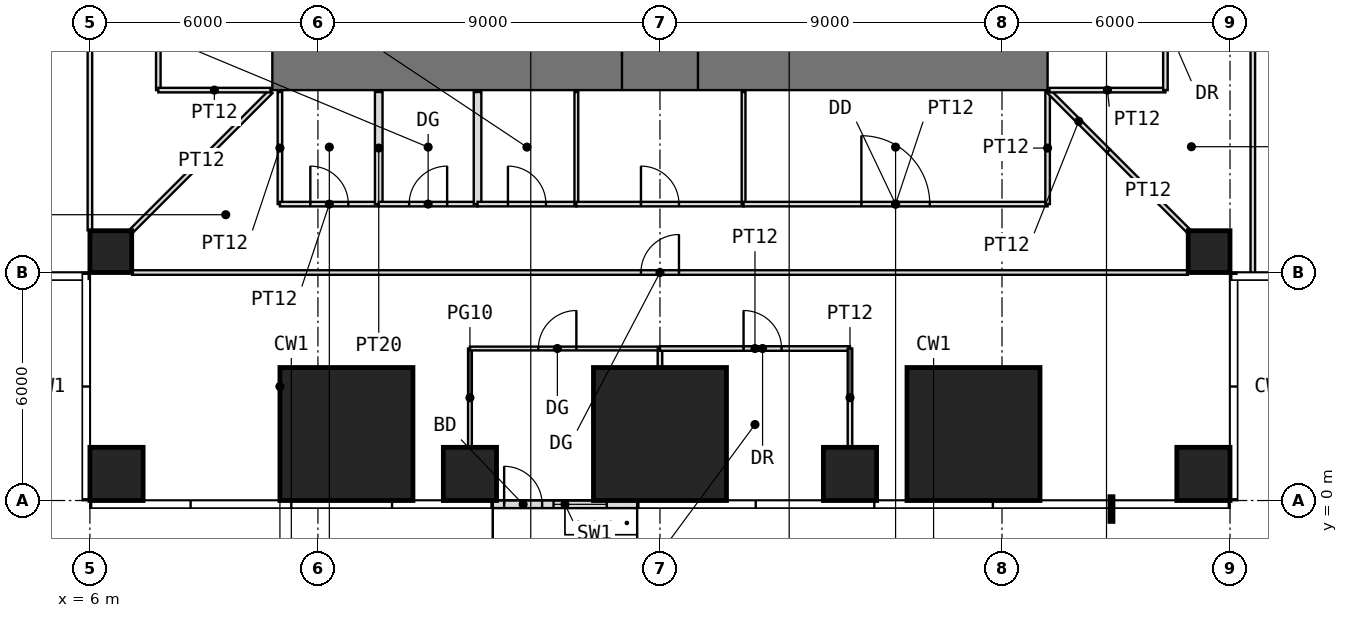
"""IFC4 building model, lengths in metres.
Left out: names, types, materials, properties, quantities, classifications, styles, units other than length and angle.
Written with IfcOpenShell. Run it as: python <this file> out.ifc"""

import sys

from ifc_helpers import new_model, si_unit, direction, frame, frame_2d, origin, origin_2d, place, context, subcontext, project, spatial, rectangle, extrude, element, fill, save


model = new_model("IFC4")
c1 = context("Model", 3, precision=1e-05, world=origin(), true_north=direction((0.0, 1.0)))
c2 = subcontext(c1, "Body", "Model", "MODEL_VIEW")
j1 = project(units=[si_unit("LENGTHUNIT", "METRE"), si_unit("PLANEANGLEUNIT", "RADIAN")], contexts=[c1])
p1 = place(None, origin())
s1 = spatial("IfcSite", under=j1, at=p1, CompositionType="ELEMENT")
p2 = place(p1, origin())
s2 = spatial("IfcBuilding", under=s1, at=p2, CompositionType="ELEMENT")
p3 = place(p2, frame((0.0, 0.0, 62.5)))
s3 = spatial("IfcBuildingStorey", under=s2, at=p3, CompositionType="ELEMENT", Elevation=62.5)
p4 = place(p3, frame((6.7, 0.7, 0.0), z_axis=(0.0, 0.0, 1.0), x_axis=(1.0, 0.0, 0.0)))
e1 = element("IfcColumn", 1, at=p4, inside=s3, PredefinedType="COLUMN", context=c2, shape_type="SweptSolid", body=[
    extrude(rectangle(XDim=1.4, YDim=1.4, at=origin_2d()), origin(), (0.0, 0.0, 1.0), 4.0),
])
p5 = place(p3, frame((12.75, 1.75, 0.0), z_axis=(0.0, 0.0, 1.0), x_axis=(1.0, 0.0, 0.0)))
e2 = element("IfcColumn", 2, at=p5, inside=s3, PredefinedType="COLUMN", context=c2, shape_type="SweptSolid", body=[
    extrude(rectangle(XDim=3.5, YDim=3.5, at=origin_2d()), origin(), (0.0, 0.0, 1.0), 4.0),
])
p6 = place(p3, frame((16.0, 0.7, 0.0), z_axis=(0.0, 0.0, 1.0), x_axis=(1.0, 0.0, 0.0)))
e3 = element("IfcColumn", 3, at=p6, inside=s3, PredefinedType="COLUMN", context=c2, shape_type="SweptSolid", body=[
    extrude(rectangle(XDim=1.4, YDim=1.4, at=origin_2d()), origin(), (0.0, 0.0, 1.0), 4.0),
])
p7 = place(p3, frame((21.0, 1.75, 0.0), z_axis=(0.0, 0.0, 1.0), x_axis=(1.0, 0.0, 0.0)))
e4 = element("IfcColumn", 4, at=p7, inside=s3, PredefinedType="COLUMN", context=c2, shape_type="SweptSolid", body=[
    extrude(rectangle(XDim=3.5, YDim=3.5, at=origin_2d()), origin(), (0.0, 0.0, 1.0), 4.0),
])
p8 = place(p3, frame((26.0, 0.7, 0.0), z_axis=(0.0, 0.0, 1.0), x_axis=(1.0, 0.0, 0.0)))
e5 = element("IfcColumn", 5, at=p8, inside=s3, PredefinedType="COLUMN", context=c2, shape_type="SweptSolid", body=[
    extrude(rectangle(XDim=1.4, YDim=1.4, at=origin_2d()), origin(), (0.0, 0.0, 1.0), 4.0),
])
p9 = place(p3, frame((29.25, 1.75, 0.0), z_axis=(0.0, 0.0, 1.0), x_axis=(1.0, 0.0, 0.0)))
e6 = element("IfcColumn", 6, at=p9, inside=s3, PredefinedType="COLUMN", context=c2, shape_type="SweptSolid", body=[
    extrude(rectangle(XDim=3.5, YDim=3.5, at=origin_2d()), origin(), (0.0, 0.0, 1.0), 4.0),
])
p10 = place(p3, frame((35.3, 0.7, 0.0), z_axis=(0.0, 0.0, 1.0), x_axis=(1.0, 0.0, 0.0)))
e7 = element("IfcColumn", 7, at=p10, inside=s3, PredefinedType="COLUMN", context=c2, shape_type="SweptSolid", body=[
    extrude(rectangle(XDim=1.4, YDim=1.4, at=origin_2d()), origin(), (0.0, 0.0, 1.0), 4.0),
])
for number, where, z_axis, x_axis in (
    (8, (6.55, 6.55, 0.0), (0.0, 0.0, 1.0), (1.0, 0.0, 0.0)),
    (9, (35.45, 6.55, 0.0), (0.0, 0.0, 1.0), (1.0, 0.0, 0.0)),
):
    element("IfcColumn", number, at=place(p3, frame(where, z_axis=z_axis, x_axis=x_axis)), inside=s3, PredefinedType="COLUMN", context=c2, shape_type="SweptSolid", body=[
        extrude(rectangle(XDim=1.1, YDim=1.1, at=origin_2d()), origin(), (0.0, 0.0, 1.0), 4.0),
    ])
p11 = place(p3, frame((16.6, -0.1, 0.0), z_axis=(0.0, 0.0, 1.0), x_axis=(1.0, 0.0, 0.0)))
e10 = element("IfcWall", 10, at=p11, inside=s3, PredefinedType="USERDEFINED", context=c2, shape_type="SweptSolid", body=[
    extrude(rectangle(XDim=3.8, YDim=0.2, at=frame_2d((1.9, 0.0))), origin(), (0.0, 0.0, 1.0), 3.75),
])
p12 = place(p11, frame((0.3, 0.0, 0.0)))
e11 = element("IfcOpeningElement", 11, at=p12, cuts=e10, PredefinedType="OPENING", context=c2, shape_type="SweptSolid", body=[
    extrude(rectangle(XDim=1.0, YDim=2.4, at=frame_2d((0.5, 1.2))), frame((0.0, 0.11, 0.0), z_axis=(0.0, -1.0, 0.0), x_axis=(1.0, 0.0, 0.0)), (0.0, 0.0, 1.0), 0.22),
])
p13 = place(p11, frame((1.6, 0.0, 0.3)))
e12 = element("IfcOpeningElement", 12, at=p13, cuts=e10, PredefinedType="OPENING", context=c2, shape_type="SweptSolid", body=[
    extrude(rectangle(XDim=1.4, YDim=2.7, at=frame_2d((0.7, 1.35))), frame((0.0, 0.11, 0.0), z_axis=(0.0, -1.0, 0.0), x_axis=(1.0, 0.0, 0.0)), (0.0, 0.0, 1.0), 0.22),
])
p14 = place(p3, frame((10.8, 11.7, -0.05), z_axis=(0.0, 0.0, 1.0), x_axis=(1.0, 0.0, 0.0)))
e13 = element("IfcWall", 13, at=p14, inside=s3, PredefinedType="SHEAR", context=c2, shape_type="SweptSolid", body=[
    extrude(rectangle(XDim=20.4, YDim=1.8, at=frame_2d((10.2, 0.0))), origin(), (0.0, 0.0, 1.0), 4.0),
])
p15 = place(p14, frame((9.2, 0.0, 0.05)))
e14 = element("IfcOpeningElement", 14, at=p15, cuts=e13, PredefinedType="OPENING", context=c2, shape_type="SweptSolid", body=[
    extrude(rectangle(XDim=2.0, YDim=2.2, at=frame_2d((1.0, 1.1))), frame((0.0, 0.91, 0.0), z_axis=(0.0, -1.0, 0.0), x_axis=(1.0, 0.0, 0.0)), (0.0, 0.0, 1.0), 1.82),
])
p16 = place(p3, frame((6.0, 7.11, 0.0), z_axis=(0.0, 0.0, 1.0), x_axis=(0.0, 1.0, 0.0)))
e15 = element("IfcWall", 15, at=p16, inside=s3, PredefinedType="PARTITIONING", context=c2, shape_type="SweptSolid", body=[
    extrude(rectangle(XDim=27.78, YDim=0.12, at=frame_2d((13.89, 0.0))), origin(), (0.0, 0.0, 1.0), 3.75),
])
p17 = place(p16, frame((13.39, 0.0, 0.0)))
e16 = element("IfcOpeningElement", 16, at=p17, cuts=e15, PredefinedType="OPENING", context=c2, shape_type="SweptSolid", body=[
    extrude(rectangle(XDim=1.0, YDim=2.4, at=frame_2d((0.5, 1.2))), frame((0.0, 0.07, 0.0), z_axis=(0.0, -1.0, 0.0), x_axis=(1.0, 0.0, 0.0)), (0.0, 0.0, 1.0), 0.14),
])
p18 = place(p3, frame((7.11, 6.0, 0.0), z_axis=(0.0, 0.0, 1.0), x_axis=(1.0, 0.0, 0.0)))
e17 = element("IfcWall", 17, at=p18, inside=s3, PredefinedType="PARTITIONING", context=c2, shape_type="SweptSolid", body=[
    extrude(rectangle(XDim=27.78, YDim=0.12, at=frame_2d((13.89, 0.0))), origin(), (0.0, 0.0, 1.0), 3.75),
])
p19 = place(p18, frame((13.39, 0.0, 0.0)))
e18 = element("IfcOpeningElement", 18, at=p19, cuts=e17, PredefinedType="OPENING", context=c2, shape_type="SweptSolid", body=[
    extrude(rectangle(XDim=1.0, YDim=2.4, at=frame_2d((0.5, 1.2))), frame((0.0, 0.07, 0.0), z_axis=(0.0, -1.0, 0.0), x_axis=(1.0, 0.0, 0.0)), (0.0, 0.0, 1.0), 0.14),
])
p20 = place(p3, frame((7.11, 7.11, 0.0), z_axis=(0.0, 0.0, 1.0), x_axis=(0.707106781187, 0.707106781187, 0.0)))
e19 = element("IfcWall", 19, at=p20, inside=s3, PredefinedType="PARTITIONING", context=c2, shape_type="SweptSolid", body=[
    extrude(rectangle(XDim=5.168, YDim=0.12, at=frame_2d((2.584, 0.0))), origin(), (0.0, 0.0, 1.0), 3.75),
])
p21 = place(p3, frame((7.8, 10.8, 0.0), z_axis=(0.0, 0.0, 1.0), x_axis=(0.0, 1.0, 0.0)))
e20 = element("IfcWall", 20, at=p21, inside=s3, PredefinedType="PARTITIONING", context=c2, shape_type="SweptSolid", body=[
    extrude(rectangle(XDim=3.8, YDim=0.12, at=frame_2d((1.9, 0.0))), origin(), (0.0, 0.0, 1.0), 3.75),
])
p22 = place(p21, frame((1.4, 0.0, 0.0)))
e21 = element("IfcOpeningElement", 21, at=p22, cuts=e20, PredefinedType="OPENING", context=c2, shape_type="SweptSolid", body=[
    extrude(rectangle(XDim=1.0, YDim=2.4, at=frame_2d((0.5, 1.2))), frame((0.0, 0.07, 0.0), z_axis=(0.0, -1.0, 0.0), x_axis=(1.0, 0.0, 0.0)), (0.0, 0.0, 1.0), 0.14),
])
for number, where, z_axis, x_axis in (
    (22, (7.8, 10.8, 0.0), (0.0, 0.0, 1.0), (1.0, 0.0, 0.0)),
    (23, (11.0, 7.8, 0.0), (0.0, 0.0, 1.0), (0.0, 1.0, 0.0)),
):
    element("IfcWall", number, at=place(p3, frame(where, z_axis=z_axis, x_axis=x_axis)), inside=s3, PredefinedType="PARTITIONING", context=c2, shape_type="SweptSolid", body=[
        extrude(rectangle(XDim=2.95, YDim=0.12, at=frame_2d((1.475, 0.0))), origin(), (0.0, 0.0, 1.0), 3.75),
    ])
p23 = place(p3, frame((11.0, 7.8, 0.0), z_axis=(0.0, 0.0, 1.0), x_axis=(1.0, 0.0, 0.0)))
e24 = element("IfcWall", 24, at=p23, inside=s3, PredefinedType="PARTITIONING", context=c2, shape_type="SweptSolid", body=[
    extrude(rectangle(XDim=2.6, YDim=0.12, at=frame_2d((1.3, 0.0))), origin(), (0.0, 0.0, 1.0), 3.75),
])
p24 = place(p23, frame((0.8, 0.0, 0.0)))
e25 = element("IfcOpeningElement", 25, at=p24, cuts=e24, PredefinedType="OPENING", context=c2, shape_type="SweptSolid", body=[
    extrude(rectangle(XDim=1.0, YDim=2.4, at=frame_2d((0.5, 1.2))), frame((0.0, 0.07, 0.0), z_axis=(0.0, -1.0, 0.0), x_axis=(1.0, 0.0, 0.0)), (0.0, 0.0, 1.0), 0.14),
])
p25 = place(p3, frame((13.6, 7.8, 0.0), z_axis=(0.0, 0.0, 1.0), x_axis=(0.0, 1.0, 0.0)))
e26 = element("IfcWall", 26, at=p25, inside=s3, PredefinedType="PARTITIONING", context=c2, shape_type="SweptSolid", body=[
    extrude(rectangle(XDim=2.95, YDim=0.2, at=frame_2d((1.475, 0.0))), origin(), (0.0, 0.0, 1.0), 3.75),
])
p26 = place(p3, frame((13.6, 7.8, 0.0), z_axis=(0.0, 0.0, 1.0), x_axis=(1.0, 0.0, 0.0)))
e27 = element("IfcWall", 27, at=p26, inside=s3, PredefinedType="PARTITIONING", context=c2, shape_type="SweptSolid", body=[
    extrude(rectangle(XDim=2.6, YDim=0.12, at=frame_2d((1.3, 0.0))), origin(), (0.0, 0.0, 1.0), 3.75),
])
p27 = place(p26, frame((0.8, 0.0, 0.0)))
e28 = element("IfcOpeningElement", 28, at=p27, cuts=e27, PredefinedType="OPENING", context=c2, shape_type="SweptSolid", body=[
    extrude(rectangle(XDim=1.0, YDim=2.4, at=frame_2d((0.5, 1.2))), frame((0.0, 0.07, 0.0), z_axis=(0.0, -1.0, 0.0), x_axis=(1.0, 0.0, 0.0)), (0.0, 0.0, 1.0), 0.14),
])
p28 = place(p3, frame((16.0, 1.41, 0.0), z_axis=(0.0, 0.0, 1.0), x_axis=(0.0, 1.0, 0.0)))
e29 = element("IfcWall", 29, at=p28, inside=s3, PredefinedType="PARTITIONING", context=c2, shape_type="SweptSolid", body=[
    extrude(rectangle(XDim=2.59, YDim=0.1, at=frame_2d((1.295, 0.0))), origin(), (0.0, 0.0, 1.0), 3.75),
])
p29 = place(p3, frame((16.0, 4.0, 0.0), z_axis=(0.0, 0.0, 1.0), x_axis=(1.0, 0.0, 0.0)))
e30 = element("IfcWall", 30, at=p29, inside=s3, PredefinedType="PARTITIONING", context=c2, shape_type="SweptSolid", body=[
    extrude(rectangle(XDim=5.0, YDim=0.1, at=frame_2d((2.5, 0.0))), origin(), (0.0, 0.0, 1.0), 3.75),
])
p30 = place(p29, frame((1.8, 0.0, 0.0)))
e31 = element("IfcOpeningElement", 31, at=p30, cuts=e30, PredefinedType="OPENING", context=c2, shape_type="SweptSolid", body=[
    extrude(rectangle(XDim=1.0, YDim=2.4, at=frame_2d((0.5, 1.2))), frame((0.0, 0.06, 0.0), z_axis=(0.0, -1.0, 0.0), x_axis=(1.0, 0.0, 0.0)), (0.0, 0.0, 1.0), 0.12),
])
p31 = place(p3, frame((16.2, 7.8, 0.0), z_axis=(0.0, 0.0, 1.0), x_axis=(0.0, 1.0, 0.0)))
e32 = element("IfcWall", 32, at=p31, inside=s3, PredefinedType="PARTITIONING", context=c2, shape_type="SweptSolid", body=[
    extrude(rectangle(XDim=2.95, YDim=0.2, at=frame_2d((1.475, 0.0))), origin(), (0.0, 0.0, 1.0), 3.75),
])
p32 = place(p3, frame((16.2, 7.8, 0.0), z_axis=(0.0, 0.0, 1.0), x_axis=(1.0, 0.0, 0.0)))
e33 = element("IfcWall", 33, at=p32, inside=s3, PredefinedType="PARTITIONING", context=c2, shape_type="SweptSolid", body=[
    extrude(rectangle(XDim=2.6, YDim=0.12, at=frame_2d((1.3, 0.0))), origin(), (0.0, 0.0, 1.0), 3.75),
])
p33 = place(p32, frame((0.8, 0.0, 0.0)))
e34 = element("IfcOpeningElement", 34, at=p33, cuts=e33, PredefinedType="OPENING", context=c2, shape_type="SweptSolid", body=[
    extrude(rectangle(XDim=1.0, YDim=2.4, at=frame_2d((0.5, 1.2))), frame((0.0, 0.07, 0.0), z_axis=(0.0, -1.0, 0.0), x_axis=(1.0, 0.0, 0.0)), (0.0, 0.0, 1.0), 0.14),
])
p34 = place(p3, frame((18.8, 7.8, 0.0), z_axis=(0.0, 0.0, 1.0), x_axis=(0.0, 1.0, 0.0)))
e35 = element("IfcWall", 35, at=p34, inside=s3, PredefinedType="PARTITIONING", context=c2, shape_type="SweptSolid", body=[
    extrude(rectangle(XDim=2.95, YDim=0.1, at=frame_2d((1.475, 0.0))), origin(), (0.0, 0.0, 1.0), 3.75),
])
p35 = place(p3, frame((18.8, 7.8, 0.0), z_axis=(0.0, 0.0, 1.0), x_axis=(1.0, 0.0, 0.0)))
e36 = element("IfcWall", 36, at=p35, inside=s3, PredefinedType="PARTITIONING", context=c2, shape_type="SweptSolid", body=[
    extrude(rectangle(XDim=4.4, YDim=0.12, at=frame_2d((2.2, 0.0))), origin(), (0.0, 0.0, 1.0), 3.75),
])
p36 = place(p35, frame((1.7, 0.0, 0.0)))
e37 = element("IfcOpeningElement", 37, at=p36, cuts=e36, PredefinedType="OPENING", context=c2, shape_type="SweptSolid", body=[
    extrude(rectangle(XDim=1.0, YDim=2.4, at=frame_2d((0.5, 1.2))), frame((0.0, 0.07, 0.0), z_axis=(0.0, -1.0, 0.0), x_axis=(1.0, 0.0, 0.0)), (0.0, 0.0, 1.0), 0.14),
])
p37 = place(p3, frame((21.0, 3.51, 0.0), z_axis=(0.0, 0.0, 1.0), x_axis=(0.0, 1.0, 0.0)))
e38 = element("IfcWall", 38, at=p37, inside=s3, PredefinedType="PARTITIONING", context=c2, shape_type="SweptSolid", body=[
    extrude(rectangle(XDim=0.49, YDim=0.12, at=frame_2d((0.245, 0.0))), origin(), (0.0, 0.0, 1.0), 3.75),
])
p38 = place(p3, frame((21.0, 4.0, 0.0), z_axis=(0.0, 0.0, 1.0), x_axis=(1.0, 0.0, 0.0)))
e39 = element("IfcWall", 39, at=p38, inside=s3, PredefinedType="PARTITIONING", context=c2, shape_type="SweptSolid", body=[
    extrude(rectangle(XDim=5.0, YDim=0.12, at=frame_2d((2.5, 0.0))), origin(), (0.0, 0.0, 1.0), 3.75),
])
p39 = place(p38, frame((2.2, 0.0, 0.0)))
e40 = element("IfcOpeningElement", 40, at=p39, cuts=e39, PredefinedType="OPENING", context=c2, shape_type="SweptSolid", body=[
    extrude(rectangle(XDim=1.0, YDim=2.2, at=frame_2d((0.5, 1.1))), frame((0.0, 0.07, 0.0), z_axis=(0.0, -1.0, 0.0), x_axis=(1.0, 0.0, 0.0)), (0.0, 0.0, 1.0), 0.14),
])
p40 = place(p3, frame((23.2, 7.8, 0.0), z_axis=(0.0, 0.0, 1.0), x_axis=(0.0, 1.0, 0.0)))
e41 = element("IfcWall", 41, at=p40, inside=s3, PredefinedType="PARTITIONING", context=c2, shape_type="SweptSolid", body=[
    extrude(rectangle(XDim=2.95, YDim=0.1, at=frame_2d((1.475, 0.0))), origin(), (0.0, 0.0, 1.0), 3.75),
])
p41 = place(p3, frame((23.2, 7.8, 0.0), z_axis=(0.0, 0.0, 1.0), x_axis=(1.0, 0.0, 0.0)))
e42 = element("IfcWall", 42, at=p41, inside=s3, PredefinedType="PARTITIONING", context=c2, shape_type="SweptSolid", body=[
    extrude(rectangle(XDim=8.0, YDim=0.12, at=frame_2d((4.0, 0.0))), origin(), (0.0, 0.0, 1.0), 3.75),
])
p42 = place(p41, frame((3.1, 0.0, 0.0)))
e43 = element("IfcOpeningElement", 43, at=p42, cuts=e42, PredefinedType="OPENING", context=c2, shape_type="SweptSolid", body=[
    extrude(rectangle(XDim=1.8, YDim=2.4, at=frame_2d((0.9, 1.2))), frame((0.0, 0.07, 0.0), z_axis=(0.0, -1.0, 0.0), x_axis=(1.0, 0.0, 0.0)), (0.0, 0.0, 1.0), 0.14),
])
p43 = place(p3, frame((26.0, 1.41, 0.0), z_axis=(0.0, 0.0, 1.0), x_axis=(0.0, 1.0, 0.0)))
e44 = element("IfcWall", 44, at=p43, inside=s3, PredefinedType="PARTITIONING", context=c2, shape_type="SweptSolid", body=[
    extrude(rectangle(XDim=2.59, YDim=0.12, at=frame_2d((1.295, 0.0))), origin(), (0.0, 0.0, 1.0), 3.75),
])
p44 = place(p3, frame((31.2, 7.8, 0.0), z_axis=(0.0, 0.0, 1.0), x_axis=(0.0, 1.0, 0.0)))
e45 = element("IfcWall", 45, at=p44, inside=s3, PredefinedType="PARTITIONING", context=c2, shape_type="SweptSolid", body=[
    extrude(rectangle(XDim=2.95, YDim=0.12, at=frame_2d((1.475, 0.0))), origin(), (0.0, 0.0, 1.0), 3.75),
])
p45 = place(p3, frame((31.235, 10.765, 0.0), z_axis=(0.0, 0.0, 1.0), x_axis=(0.707106781187, -0.707106781187, 0.0)))
e46 = element("IfcWall", 46, at=p45, inside=s3, PredefinedType="PARTITIONING", context=c2, shape_type="SweptSolid", body=[
    extrude(rectangle(XDim=2.218, YDim=0.12, at=frame_2d((1.109, 0.0))), origin(), (0.0, 0.0, 1.0), 3.75),
])
p46 = place(p3, frame((31.25, 10.8, 0.0), z_axis=(0.0, 0.0, 1.0), x_axis=(1.0, 0.0, 0.0)))
e47 = element("IfcWall", 47, at=p46, inside=s3, PredefinedType="PARTITIONING", context=c2, shape_type="SweptSolid", body=[
    extrude(rectangle(XDim=3.05, YDim=0.12, at=frame_2d((1.525, 0.0))), origin(), (0.0, 0.0, 1.0), 3.75),
])
p47 = place(p3, frame((32.804, 9.196, 0.0), z_axis=(0.0, 0.0, 1.0), x_axis=(0.707106781187, -0.707106781187, 0.0)))
e48 = element("IfcWall", 48, at=p47, inside=s3, PredefinedType="PARTITIONING", context=c2, shape_type="SweptSolid", body=[
    extrude(rectangle(XDim=2.95, YDim=0.12, at=frame_2d((1.475, 0.0))), origin(), (0.0, 0.0, 1.0), 3.75),
])
p48 = place(p3, frame((34.3, 10.8, 0.0), z_axis=(0.0, 0.0, 1.0), x_axis=(0.0, 1.0, 0.0)))
e49 = element("IfcWall", 49, at=p48, inside=s3, PredefinedType="PARTITIONING", context=c2, shape_type="SweptSolid", body=[
    extrude(rectangle(XDim=3.6, YDim=0.12, at=frame_2d((1.8, 0.0))), origin(), (0.0, 0.0, 1.0), 3.75),
])
p49 = place(p48, frame((1.3, 0.0, 0.0)))
e50 = element("IfcOpeningElement", 50, at=p49, cuts=e49, PredefinedType="OPENING", context=c2, shape_type="SweptSolid", body=[
    extrude(rectangle(XDim=1.0, YDim=2.2, at=frame_2d((0.5, 1.1))), frame((0.0, 0.07, 0.0), z_axis=(0.0, -1.0, 0.0), x_axis=(1.0, 0.0, 0.0)), (0.0, 0.0, 1.0), 0.14),
])
p50 = place(p3, frame((36.6, 6.0, 0.0), z_axis=(0.0, 0.0, 1.0), x_axis=(0.0, 1.0, 0.0)))
e51 = element("IfcWall", 51, at=p50, inside=s3, PredefinedType="PARTITIONING", context=c2, shape_type="SweptSolid", body=[
    extrude(rectangle(XDim=30.0, YDim=0.12, at=frame_2d((15.0, 0.0))), origin(), (0.0, 0.0, 1.0), 3.75),
])
p51 = place(p50, frame((14.5, 0.0, 0.0)))
e52 = element("IfcOpeningElement", 52, at=p51, cuts=e51, PredefinedType="OPENING", context=c2, shape_type="SweptSolid", body=[
    extrude(rectangle(XDim=1.0, YDim=2.4, at=frame_2d((0.5, 1.2))), frame((0.0, 0.07, 0.0), z_axis=(0.0, -1.0, 0.0), x_axis=(1.0, 0.0, 0.0)), (0.0, 0.0, 1.0), 0.14),
])
p52 = place(p12, origin())
e53 = element("IfcDoor", 53, at=p52, inside=s3, OperationType="SINGLE_SWING_LEFT", PredefinedType="DOOR", context=c2, shape_type="SweptSolid", body=[
    extrude(rectangle(XDim=1.0, YDim=2.4, at=frame_2d((0.5, 1.2))), frame((0.0, 0.025, 0.0), z_axis=(0.0, -1.0, 0.0), x_axis=(1.0, 0.0, 0.0)), (0.0, 0.0, 1.0), 0.05),
])
fill(e11, e53)
p53 = place(p13, origin())
e54 = element("IfcWindow", 54, at=p53, inside=s3, PartitioningType="SINGLE_PANEL", PredefinedType="WINDOW", context=c2, shape_type="SweptSolid", body=[
    extrude(rectangle(XDim=1.4, YDim=2.7, at=frame_2d((0.7, 1.35))), frame((0.0, 0.03, 0.0), z_axis=(0.0, -1.0, 0.0), x_axis=(1.0, 0.0, 0.0)), (0.0, 0.0, 1.0), 0.06),
])
fill(e12, e54)
p54 = place(p15, origin())
e55 = element("IfcDoor", 55, at=p54, inside=s3, OperationType="DOUBLE_DOOR_SINGLE_SWING", PredefinedType="DOOR", context=c2, shape_type="SweptSolid", body=[
    extrude(rectangle(XDim=2.0, YDim=2.2, at=frame_2d((1.0, 1.1))), frame((0.0, 0.025, 0.0), z_axis=(0.0, -1.0, 0.0), x_axis=(1.0, 0.0, 0.0)), (0.0, 0.0, 1.0), 0.05),
])
fill(e14, e55)
p55 = place(p24, origin())
e56 = element("IfcDoor", 56, at=p55, inside=s3, OperationType="SINGLE_SWING_LEFT", PredefinedType="DOOR", context=c2, shape_type="SweptSolid", body=[
    extrude(rectangle(XDim=1.0, YDim=2.4, at=frame_2d((0.5, 1.2))), frame((0.0, 0.025, 0.0), z_axis=(0.0, -1.0, 0.0), x_axis=(1.0, 0.0, 0.0)), (0.0, 0.0, 1.0), 0.05),
])
fill(e25, e56)
p56 = place(p27, origin())
e57 = element("IfcDoor", 57, at=p56, inside=s3, OperationType="SINGLE_SWING_RIGHT", PredefinedType="DOOR", context=c2, shape_type="SweptSolid", body=[
    extrude(rectangle(XDim=1.0, YDim=2.4, at=frame_2d((0.5, 1.2))), frame((0.0, 0.025, 0.0), z_axis=(0.0, -1.0, 0.0), x_axis=(1.0, 0.0, 0.0)), (0.0, 0.0, 1.0), 0.05),
])
fill(e28, e57)
p57 = place(p33, origin())
e58 = element("IfcDoor", 58, at=p57, inside=s3, OperationType="SINGLE_SWING_LEFT", PredefinedType="DOOR", context=c2, shape_type="SweptSolid", body=[
    extrude(rectangle(XDim=1.0, YDim=2.4, at=frame_2d((0.5, 1.2))), frame((0.0, 0.025, 0.0), z_axis=(0.0, -1.0, 0.0), x_axis=(1.0, 0.0, 0.0)), (0.0, 0.0, 1.0), 0.05),
])
fill(e34, e58)
p58 = place(p42, origin())
e59 = element("IfcDoor", 59, at=p58, inside=s3, OperationType="DOUBLE_DOOR_SINGLE_SWING", PredefinedType="DOOR", context=c2, shape_type="SweptSolid", body=[
    extrude(rectangle(XDim=1.8, YDim=2.4, at=frame_2d((0.9, 1.2))), frame((0.0, 0.025, 0.0), z_axis=(0.0, -1.0, 0.0), x_axis=(1.0, 0.0, 0.0)), (0.0, 0.0, 1.0), 0.05),
])
fill(e43, e59)
p59 = place(p30, origin())
e60 = element("IfcDoor", 60, at=p59, inside=s3, OperationType="SINGLE_SWING_RIGHT", PredefinedType="DOOR", context=c2, shape_type="SweptSolid", body=[
    extrude(rectangle(XDim=1.0, YDim=2.4, at=frame_2d((0.5, 1.2))), frame((0.0, 0.025, 0.0), z_axis=(0.0, -1.0, 0.0), x_axis=(1.0, 0.0, 0.0)), (0.0, 0.0, 1.0), 0.05),
])
fill(e31, e60)
p60 = place(p39, origin())
e61 = element("IfcDoor", 61, at=p60, inside=s3, OperationType="SINGLE_SWING_LEFT", PredefinedType="DOOR", context=c2, shape_type="SweptSolid", body=[
    extrude(rectangle(XDim=1.0, YDim=2.2, at=frame_2d((0.5, 1.1))), frame((0.0, 0.025, 0.0), z_axis=(0.0, -1.0, 0.0), x_axis=(1.0, 0.0, 0.0)), (0.0, 0.0, 1.0), 0.05),
])
fill(e40, e61)
p61 = place(p19, origin())
e62 = element("IfcDoor", 62, at=p61, inside=s3, OperationType="SINGLE_SWING_RIGHT", PredefinedType="DOOR", context=c2, shape_type="SweptSolid", body=[
    extrude(rectangle(XDim=1.0, YDim=2.4, at=frame_2d((0.5, 1.2))), frame((0.0, 0.025, 0.0), z_axis=(0.0, -1.0, 0.0), x_axis=(1.0, 0.0, 0.0)), (0.0, 0.0, 1.0), 0.05),
])
fill(e18, e62)
p62 = place(p36, origin())
e63 = element("IfcDoor", 63, at=p62, inside=s3, OperationType="SINGLE_SWING_LEFT", PredefinedType="DOOR", context=c2, shape_type="SweptSolid", body=[
    extrude(rectangle(XDim=1.0, YDim=2.4, at=frame_2d((0.5, 1.2))), frame((0.0, 0.025, 0.0), z_axis=(0.0, -1.0, 0.0), x_axis=(1.0, 0.0, 0.0)), (0.0, 0.0, 1.0), 0.05),
])
fill(e37, e63)
save(model, sys.argv[1])
